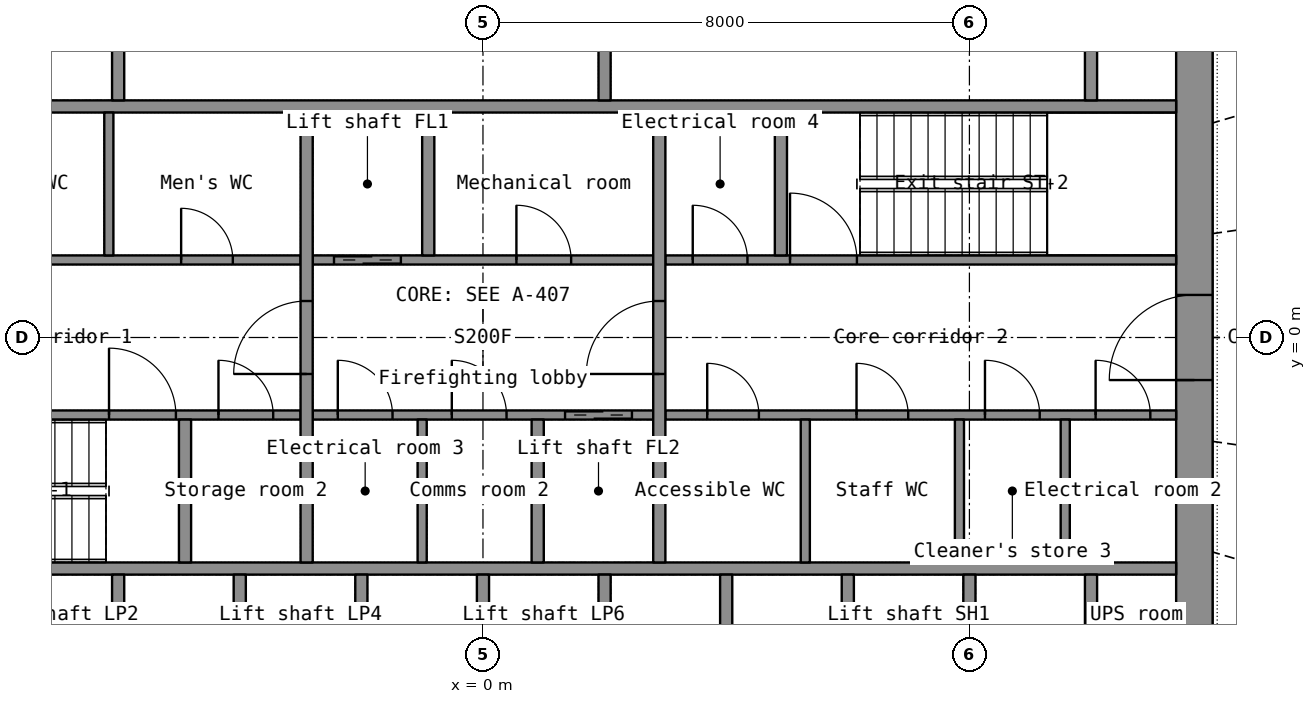
"""IFC4 building model, lengths in metres.
Left out: names, types, materials, properties, quantities, classifications, styles, units other than length and angle.
Written with IfcOpenShell. Run it as: python <this file> out.ifc"""

import sys

from ifc_helpers import new_model, si_unit, direction, frame, frame_2d, origin, place, context, subcontext, project, spatial, rectangle, extrude, element, fill, save


model = new_model("IFC4")
c1 = context("Model", 3, precision=1e-05, world=origin(), true_north=direction((0.0, 1.0)))
c2 = subcontext(c1, "Body", "Model", "MODEL_VIEW")
j1 = project(units=[si_unit("LENGTHUNIT", "METRE"), si_unit("PLANEANGLEUNIT", "RADIAN")], contexts=[c1])
p1 = place(None, origin())
s1 = spatial("IfcSite", under=j1, at=p1, CompositionType="ELEMENT")
p2 = place(p1, origin())
s2 = spatial("IfcBuilding", under=s1, at=p2, CompositionType="ELEMENT")
p3 = place(p2, frame((0.0, 0.0, 32.9)))
s3 = spatial("IfcBuildingStorey", under=s2, at=p3, CompositionType="ELEMENT", Elevation=32.9)
p4 = place(p3, frame((11.7, -7.2, 0.0), z_axis=(0.0, 0.0, 1.0), x_axis=(0.0, 1.0, 0.0)))
e1 = element("IfcWall", 1, at=p4, inside=s3, PredefinedType="SHEAR", context=c2, shape_type="SweptSolid", body=[
    extrude(rectangle(XDim=14.4, YDim=0.6, at=frame_2d((7.2, 0.0))), origin(), (0.0, 0.0, 1.0), 3.8),
])
p5 = place(p4, frame((6.5, 0.0, 0.0)))
e2 = element("IfcOpeningElement", 2, at=p5, cuts=e1, PredefinedType="OPENING", context=c2, shape_type="SweptSolid", body=[
    extrude(rectangle(XDim=1.4, YDim=2.2, at=frame_2d((0.7, 1.1))), frame((0.0, 0.31, 0.0), z_axis=(0.0, -1.0, 0.0), x_axis=(1.0, 0.0, 0.0)), (0.0, 0.0, 1.0), 0.62),
])
for number, where, z_axis, x_axis in (
    (3, (-11.4, -3.8, 0.0), (0.0, 0.0, 1.0), (1.0, 0.0, 0.0)),
    (4, (-11.4, 3.8, 0.0), (0.0, 0.0, 1.0), (1.0, 0.0, 0.0)),
):
    element("IfcWall", number, at=place(p3, frame(where, z_axis=z_axis, x_axis=x_axis)), inside=s3, PredefinedType="SHEAR", context=c2, shape_type="SweptSolid", body=[
        extrude(rectangle(XDim=22.8, YDim=0.2, at=frame_2d((11.4, 0.0))), origin(), (0.0, 0.0, 1.0), 3.8),
    ])
for number, where, z_axis, x_axis in (
    (5, (-6.0, -6.6, 0.0), (0.0, 0.0, 1.0), (0.0, 1.0, 0.0)),
    (6, (-4.0, -6.6, 0.0), (0.0, 0.0, 1.0), (0.0, 1.0, 0.0)),
    (7, (-2.0, -6.6, 0.0), (0.0, 0.0, 1.0), (0.0, 1.0, 0.0)),
    (8, (0.0, -6.6, 0.0), (0.0, 0.0, 1.0), (0.0, 1.0, 0.0)),
    (9, (2.0, -6.6, 0.0), (0.0, 0.0, 1.0), (0.0, 1.0, 0.0)),
    (10, (4.0, -6.6, 0.0), (0.0, 0.0, 1.0), (0.0, 1.0, 0.0)),
    (11, (6.0, -6.6, 0.0), (0.0, 0.0, 1.0), (0.0, 1.0, 0.0)),
    (12, (8.0, -6.6, 0.0), (0.0, 0.0, 1.0), (0.0, 1.0, 0.0)),
    (13, (10.0, -6.6, 0.0), (0.0, 0.0, 1.0), (0.0, 1.0, 0.0)),
    (14, (-6.0, 3.9, 0.0), (0.0, 0.0, 1.0), (0.0, 1.0, 0.0)),
    (15, (10.0, 3.9, 0.0), (0.0, 0.0, 1.0), (0.0, 1.0, 0.0)),
):
    element("IfcWall", number, at=place(p3, frame(where, z_axis=z_axis, x_axis=x_axis)), inside=s3, PredefinedType="SHEAR", context=c2, shape_type="SweptSolid", body=[
        extrude(rectangle(XDim=2.7, YDim=0.2, at=frame_2d((1.35, 0.0))), origin(), (0.0, 0.0, 1.0), 3.8),
    ])
p6 = place(p3, frame((2.0, 3.9, 0.0), z_axis=(0.0, 0.0, 1.0), x_axis=(0.0, 1.0, 0.0)))
e16 = element("IfcWall", 16, at=p6, inside=s3, PredefinedType="PARTITIONING", context=c2, shape_type="SweptSolid", body=[
    extrude(rectangle(XDim=2.7, YDim=0.2, at=frame_2d((1.35, 0.0))), origin(), (0.0, 0.0, 1.0), 3.8),
])
p7 = place(p3, frame((-11.4, -1.275, 0.0), z_axis=(0.0, 0.0, 1.0), x_axis=(1.0, 0.0, 0.0)))
e17 = element("IfcWall", 17, at=p7, inside=s3, PredefinedType="SHEAR", context=c2, shape_type="SweptSolid", body=[
    extrude(rectangle(XDim=8.4, YDim=0.15, at=frame_2d((4.2, 0.0))), origin(), (0.0, 0.0, 1.0), 3.8),
])
p8 = place(p7, frame((5.25, 0.0, 0.0)))
e18 = element("IfcOpeningElement", 18, at=p8, cuts=e17, PredefinedType="OPENING", context=c2, shape_type="SweptSolid", body=[
    extrude(rectangle(XDim=1.1, YDim=2.15, at=frame_2d((0.55, 1.075))), frame((0.0, 0.085, 0.0), z_axis=(0.0, -1.0, 0.0), x_axis=(1.0, 0.0, 0.0)), (0.0, 0.0, 1.0), 0.17),
])
p9 = place(p7, frame((7.05, 0.0, 0.0)))
e19 = element("IfcOpeningElement", 19, at=p9, cuts=e17, PredefinedType="OPENING", context=c2, shape_type="SweptSolid", body=[
    extrude(rectangle(XDim=0.9, YDim=2.1, at=frame_2d((0.45, 1.05))), frame((0.0, 0.085, 0.0), z_axis=(0.0, -1.0, 0.0), x_axis=(1.0, 0.0, 0.0)), (0.0, 0.0, 1.0), 0.17),
])
p10 = place(p3, frame((-2.8, -1.275, 0.0), z_axis=(0.0, 0.0, 1.0), x_axis=(1.0, 0.0, 0.0)))
e20 = element("IfcWall", 20, at=p10, inside=s3, PredefinedType="SHEAR", context=c2, shape_type="SweptSolid", body=[
    extrude(rectangle(XDim=5.6, YDim=0.15, at=frame_2d((2.8, 0.0))), origin(), (0.0, 0.0, 1.0), 3.8),
])
p11 = place(p10, frame((4.15, 0.0, 0.0)))
e21 = element("IfcOpeningElement", 21, at=p11, cuts=e20, PredefinedType="OPENING", context=c2, shape_type="SweptSolid", body=[
    extrude(rectangle(XDim=1.1, YDim=2.2, at=frame_2d((0.55, 1.1))), frame((0.0, 0.085, 0.0), z_axis=(0.0, -1.0, 0.0), x_axis=(1.0, 0.0, 0.0)), (0.0, 0.0, 1.0), 0.17),
])
p12 = place(p10, frame((0.413, 0.0, 0.0)))
e22 = element("IfcOpeningElement", 22, at=p12, cuts=e20, PredefinedType="OPENING", context=c2, shape_type="SweptSolid", body=[
    extrude(rectangle(XDim=0.9, YDim=2.1, at=frame_2d((0.45, 1.05))), frame((0.0, 0.085, 0.0), z_axis=(0.0, -1.0, 0.0), x_axis=(1.0, 0.0, 0.0)), (0.0, 0.0, 1.0), 0.17),
])
p13 = place(p10, frame((2.288, 0.0, 0.0)))
e23 = element("IfcOpeningElement", 23, at=p13, cuts=e20, PredefinedType="OPENING", context=c2, shape_type="SweptSolid", body=[
    extrude(rectangle(XDim=0.9, YDim=2.1, at=frame_2d((0.45, 1.05))), frame((0.0, 0.085, 0.0), z_axis=(0.0, -1.0, 0.0), x_axis=(1.0, 0.0, 0.0)), (0.0, 0.0, 1.0), 0.17),
])
p14 = place(p3, frame((3.0, -1.275, 0.0), z_axis=(0.0, 0.0, 1.0), x_axis=(1.0, 0.0, 0.0)))
e24 = element("IfcWall", 24, at=p14, inside=s3, PredefinedType="PARTITIONING", context=c2, shape_type="SweptSolid", body=[
    extrude(rectangle(XDim=8.4, YDim=0.15, at=frame_2d((4.2, 0.0))), origin(), (0.0, 0.0, 1.0), 3.8),
])
p15 = place(p14, frame((0.688, 0.0, 0.0)))
e25 = element("IfcOpeningElement", 25, at=p15, cuts=e24, PredefinedType="OPENING", context=c2, shape_type="SweptSolid", body=[
    extrude(rectangle(XDim=0.85, YDim=2.1, at=frame_2d((0.425, 1.05))), frame((0.0, 0.085, 0.0), z_axis=(0.0, -1.0, 0.0), x_axis=(1.0, 0.0, 0.0)), (0.0, 0.0, 1.0), 0.17),
])
p16 = place(p14, frame((3.144, 0.0, 0.0)))
e26 = element("IfcOpeningElement", 26, at=p16, cuts=e24, PredefinedType="OPENING", context=c2, shape_type="SweptSolid", body=[
    extrude(rectangle(XDim=0.85, YDim=2.1, at=frame_2d((0.425, 1.05))), frame((0.0, 0.085, 0.0), z_axis=(0.0, -1.0, 0.0), x_axis=(1.0, 0.0, 0.0)), (0.0, 0.0, 1.0), 0.17),
])
p17 = place(p14, frame((5.256, 0.0, 0.0)))
e27 = element("IfcOpeningElement", 27, at=p17, cuts=e24, PredefinedType="OPENING", context=c2, shape_type="SweptSolid", body=[
    extrude(rectangle(XDim=0.9, YDim=2.1, at=frame_2d((0.45, 1.05))), frame((0.0, 0.085, 0.0), z_axis=(0.0, -1.0, 0.0), x_axis=(1.0, 0.0, 0.0)), (0.0, 0.0, 1.0), 0.17),
])
p18 = place(p14, frame((7.075, 0.0, 0.0)))
e28 = element("IfcOpeningElement", 28, at=p18, cuts=e24, PredefinedType="OPENING", context=c2, shape_type="SweptSolid", body=[
    extrude(rectangle(XDim=0.9, YDim=2.1, at=frame_2d((0.45, 1.05))), frame((0.0, 0.085, 0.0), z_axis=(0.0, -1.0, 0.0), x_axis=(1.0, 0.0, 0.0)), (0.0, 0.0, 1.0), 0.17),
])
p19 = place(p3, frame((-11.4, 1.275, 0.0), z_axis=(0.0, 0.0, 1.0), x_axis=(1.0, 0.0, 0.0)))
e29 = element("IfcWall", 29, at=p19, inside=s3, PredefinedType="PARTITIONING", context=c2, shape_type="SweptSolid", body=[
    extrude(rectangle(XDim=8.4, YDim=0.15, at=frame_2d((4.2, 0.0))), origin(), (0.0, 0.0, 1.0), 3.8),
])
p20 = place(p19, frame((0.522, 0.0, 0.0)))
e30 = element("IfcOpeningElement", 30, at=p20, cuts=e29, PredefinedType="OPENING", context=c2, shape_type="SweptSolid", body=[
    extrude(rectangle(XDim=0.9, YDim=2.1, at=frame_2d((0.45, 1.05))), frame((0.0, 0.085, 0.0), z_axis=(0.0, -1.0, 0.0), x_axis=(1.0, 0.0, 0.0)), (0.0, 0.0, 1.0), 0.17),
])
p21 = place(p19, frame((3.208, 0.0, 0.0)))
e31 = element("IfcOpeningElement", 31, at=p21, cuts=e29, PredefinedType="OPENING", context=c2, shape_type="SweptSolid", body=[
    extrude(rectangle(XDim=0.85, YDim=2.1, at=frame_2d((0.425, 1.05))), frame((0.0, 0.085, 0.0), z_axis=(0.0, -1.0, 0.0), x_axis=(1.0, 0.0, 0.0)), (0.0, 0.0, 1.0), 0.17),
])
p22 = place(p19, frame((6.436, 0.0, 0.0)))
e32 = element("IfcOpeningElement", 32, at=p22, cuts=e29, PredefinedType="OPENING", context=c2, shape_type="SweptSolid", body=[
    extrude(rectangle(XDim=0.85, YDim=2.1, at=frame_2d((0.425, 1.05))), frame((0.0, 0.085, 0.0), z_axis=(0.0, -1.0, 0.0), x_axis=(1.0, 0.0, 0.0)), (0.0, 0.0, 1.0), 0.17),
])
p23 = place(p3, frame((-2.8, 1.275, 0.0), z_axis=(0.0, 0.0, 1.0), x_axis=(1.0, 0.0, 0.0)))
e33 = element("IfcWall", 33, at=p23, inside=s3, PredefinedType="SHEAR", context=c2, shape_type="SweptSolid", body=[
    extrude(rectangle(XDim=5.6, YDim=0.15, at=frame_2d((2.8, 0.0))), origin(), (0.0, 0.0, 1.0), 3.8),
])
p24 = place(p23, frame((0.35, 0.0, 0.0)))
e34 = element("IfcOpeningElement", 34, at=p24, cuts=e33, PredefinedType="OPENING", context=c2, shape_type="SweptSolid", body=[
    extrude(rectangle(XDim=1.1, YDim=2.2, at=frame_2d((0.55, 1.1))), frame((0.0, 0.085, 0.0), z_axis=(0.0, -1.0, 0.0), x_axis=(1.0, 0.0, 0.0)), (0.0, 0.0, 1.0), 0.17),
])
p25 = place(p23, frame((3.35, 0.0, 0.0)))
e35 = element("IfcOpeningElement", 35, at=p25, cuts=e33, PredefinedType="OPENING", context=c2, shape_type="SweptSolid", body=[
    extrude(rectangle(XDim=0.9, YDim=2.1, at=frame_2d((0.45, 1.05))), frame((0.0, 0.085, 0.0), z_axis=(0.0, -1.0, 0.0), x_axis=(1.0, 0.0, 0.0)), (0.0, 0.0, 1.0), 0.17),
])
p26 = place(p3, frame((3.0, 1.275, 0.0), z_axis=(0.0, 0.0, 1.0), x_axis=(1.0, 0.0, 0.0)))
e36 = element("IfcWall", 36, at=p26, inside=s3, PredefinedType="SHEAR", context=c2, shape_type="SweptSolid", body=[
    extrude(rectangle(XDim=8.4, YDim=0.15, at=frame_2d((4.2, 0.0))), origin(), (0.0, 0.0, 1.0), 3.8),
])
p27 = place(p26, frame((2.05, 0.0, 0.0)))
e37 = element("IfcOpeningElement", 37, at=p27, cuts=e36, PredefinedType="OPENING", context=c2, shape_type="SweptSolid", body=[
    extrude(rectangle(XDim=1.1, YDim=2.15, at=frame_2d((0.55, 1.075))), frame((0.0, 0.085, 0.0), z_axis=(0.0, -1.0, 0.0), x_axis=(1.0, 0.0, 0.0)), (0.0, 0.0, 1.0), 0.17),
])
p28 = place(p26, frame((0.45, 0.0, 0.0)))
e38 = element("IfcOpeningElement", 38, at=p28, cuts=e36, PredefinedType="OPENING", context=c2, shape_type="SweptSolid", body=[
    extrude(rectangle(XDim=0.9, YDim=2.1, at=frame_2d((0.45, 1.05))), frame((0.0, 0.085, 0.0), z_axis=(0.0, -1.0, 0.0), x_axis=(1.0, 0.0, 0.0)), (0.0, 0.0, 1.0), 0.17),
])
p29 = place(p3, frame((-2.9, -3.7, 0.0), z_axis=(0.0, 0.0, 1.0), x_axis=(0.0, 1.0, 0.0)))
e39 = element("IfcWall", 39, at=p29, inside=s3, PredefinedType="SHEAR", context=c2, shape_type="SweptSolid", body=[
    extrude(rectangle(XDim=7.4, YDim=0.2, at=frame_2d((3.7, 0.0))), origin(), (0.0, 0.0, 1.0), 3.8),
])
p30 = place(p29, frame((3.1, 0.0, 0.0)))
e40 = element("IfcOpeningElement", 40, at=p30, cuts=e39, PredefinedType="OPENING", context=c2, shape_type="SweptSolid", body=[
    extrude(rectangle(XDim=1.2, YDim=2.2, at=frame_2d((0.6, 1.1))), frame((0.0, 0.11, 0.0), z_axis=(0.0, -1.0, 0.0), x_axis=(1.0, 0.0, 0.0)), (0.0, 0.0, 1.0), 0.22),
])
p31 = place(p3, frame((2.9, -3.7, 0.0), z_axis=(0.0, 0.0, 1.0), x_axis=(0.0, 1.0, 0.0)))
e41 = element("IfcWall", 41, at=p31, inside=s3, PredefinedType="SHEAR", context=c2, shape_type="SweptSolid", body=[
    extrude(rectangle(XDim=7.4, YDim=0.2, at=frame_2d((3.7, 0.0))), origin(), (0.0, 0.0, 1.0), 3.8),
])
p32 = place(p31, frame((3.1, 0.0, 0.0)))
e42 = element("IfcOpeningElement", 42, at=p32, cuts=e41, PredefinedType="OPENING", context=c2, shape_type="SweptSolid", body=[
    extrude(rectangle(XDim=1.2, YDim=2.2, at=frame_2d((0.6, 1.1))), frame((0.0, 0.11, 0.0), z_axis=(0.0, -1.0, 0.0), x_axis=(1.0, 0.0, 0.0)), (0.0, 0.0, 1.0), 0.22),
])
for number, where, z_axis, x_axis in (
    (43, (-0.9, 1.35, 0.0), (0.0, 0.0, 1.0), (0.0, 1.0, 0.0)),
    (44, (0.9, -3.7, 0.0), (0.0, 0.0, 1.0), (0.0, 1.0, 0.0)),
    (45, (-4.9, -3.7, 0.0), (0.0, 0.0, 1.0), (0.0, 1.0, 0.0)),
    (46, (4.9, 1.35, 0.0), (0.0, 0.0, 1.0), (0.0, 1.0, 0.0)),
):
    element("IfcWall", number, at=place(p3, frame(where, z_axis=z_axis, x_axis=x_axis)), inside=s3, PredefinedType="SHEAR", context=c2, shape_type="SweptSolid", body=[
        extrude(rectangle(XDim=2.35, YDim=0.2, at=frame_2d((1.175, 0.0))), origin(), (0.0, 0.0, 1.0), 3.8),
    ])
for number, where, z_axis, x_axis in (
    (47, (-6.153, 1.35, 0.0), (0.0, 0.0, 1.0), (0.0, 1.0, 0.0)),
    (48, (5.301, -3.7, 0.0), (0.0, 0.0, 1.0), (0.0, 1.0, 0.0)),
    (49, (7.836, -3.7, 0.0), (0.0, 0.0, 1.0), (0.0, 1.0, 0.0)),
    (50, (9.576, -3.7, 0.0), (0.0, 0.0, 1.0), (0.0, 1.0, 0.0)),
    (51, (-1.0, -3.7, 0.0), (0.0, 0.0, 1.0), (0.0, 1.0, 0.0)),
):
    element("IfcWall", number, at=place(p3, frame(where, z_axis=z_axis, x_axis=x_axis)), inside=s3, PredefinedType="PARTITIONING", context=c2, shape_type="SweptSolid", body=[
        extrude(rectangle(XDim=2.35, YDim=0.15, at=frame_2d((1.175, 0.0))), origin(), (0.0, 0.0, 1.0), 3.8),
    ])
p33 = place(p5, origin())
e52 = element("IfcDoor", 52, at=p33, inside=s3, OperationType="DOUBLE_DOOR_SINGLE_SWING", PredefinedType="DOOR", context=c2, shape_type="SweptSolid", body=[
    extrude(rectangle(XDim=1.4, YDim=2.2, at=frame_2d((0.7, 1.1))), frame((0.0, 0.025, 0.0), z_axis=(0.0, -1.0, 0.0), x_axis=(1.0, 0.0, 0.0)), (0.0, 0.0, 1.0), 0.05),
])
fill(e2, e52)
p34 = place(p30, origin())
e53 = element("IfcDoor", 53, at=p34, inside=s3, OperationType="SINGLE_SWING_LEFT", PredefinedType="DOOR", context=c2, shape_type="SweptSolid", body=[
    extrude(rectangle(XDim=1.2, YDim=2.2, at=frame_2d((0.6, 1.1))), frame((0.0, 0.025, 0.0), z_axis=(0.0, -1.0, 0.0), x_axis=(1.0, 0.0, 0.0)), (0.0, 0.0, 1.0), 0.05),
])
fill(e40, e53)
p35 = place(p32, origin())
e54 = element("IfcDoor", 54, at=p35, inside=s3, OperationType="SINGLE_SWING_LEFT", PredefinedType="DOOR", context=c2, shape_type="SweptSolid", body=[
    extrude(rectangle(XDim=1.2, YDim=2.2, at=frame_2d((0.6, 1.1))), frame((0.0, 0.025, 0.0), z_axis=(0.0, -1.0, 0.0), x_axis=(1.0, 0.0, 0.0)), (0.0, 0.0, 1.0), 0.05),
])
fill(e42, e54)
p36 = place(p24, origin())
e55 = element("IfcDoor", 55, at=p36, inside=s3, OperationType="DOUBLE_DOOR_SLIDING", PredefinedType="DOOR", context=c2, shape_type="SweptSolid", body=[
    extrude(rectangle(XDim=1.1, YDim=2.2, at=frame_2d((0.55, 1.1))), frame((0.0, 0.025, 0.0), z_axis=(0.0, -1.0, 0.0), x_axis=(1.0, 0.0, 0.0)), (0.0, 0.0, 1.0), 0.05),
])
fill(e34, e55)
p37 = place(p11, origin())
e56 = element("IfcDoor", 56, at=p37, inside=s3, OperationType="DOUBLE_DOOR_SLIDING", PredefinedType="DOOR", context=c2, shape_type="SweptSolid", body=[
    extrude(rectangle(XDim=1.1, YDim=2.2, at=frame_2d((0.55, 1.1))), frame((0.0, 0.025, 0.0), z_axis=(0.0, -1.0, 0.0), x_axis=(1.0, 0.0, 0.0)), (0.0, 0.0, 1.0), 0.05),
])
fill(e21, e56)
p38 = place(p8, origin())
e57 = element("IfcDoor", 57, at=p38, inside=s3, OperationType="SINGLE_SWING_LEFT", PredefinedType="DOOR", context=c2, shape_type="SweptSolid", body=[
    extrude(rectangle(XDim=1.1, YDim=2.15, at=frame_2d((0.55, 1.075))), frame((0.0, 0.025, 0.0), z_axis=(0.0, -1.0, 0.0), x_axis=(1.0, 0.0, 0.0)), (0.0, 0.0, 1.0), 0.05),
])
fill(e18, e57)
p39 = place(p27, origin())
e58 = element("IfcDoor", 58, at=p39, inside=s3, OperationType="SINGLE_SWING_LEFT", PredefinedType="DOOR", context=c2, shape_type="SweptSolid", body=[
    extrude(rectangle(XDim=1.1, YDim=2.15, at=frame_2d((0.55, 1.075))), frame((0.0, 0.025, 0.0), z_axis=(0.0, -1.0, 0.0), x_axis=(1.0, 0.0, 0.0)), (0.0, 0.0, 1.0), 0.05),
])
fill(e37, e58)
p40 = place(p22, origin())
e59 = element("IfcDoor", 59, at=p40, inside=s3, OperationType="SINGLE_SWING_LEFT", PredefinedType="DOOR", context=c2, shape_type="SweptSolid", body=[
    extrude(rectangle(XDim=0.85, YDim=2.1, at=frame_2d((0.425, 1.05))), frame((0.0, 0.025, 0.0), z_axis=(0.0, -1.0, 0.0), x_axis=(1.0, 0.0, 0.0)), (0.0, 0.0, 1.0), 0.05),
])
fill(e32, e59)
p41 = place(p15, origin())
e60 = element("IfcDoor", 60, at=p41, inside=s3, OperationType="SINGLE_SWING_LEFT", PredefinedType="DOOR", context=c2, shape_type="SweptSolid", body=[
    extrude(rectangle(XDim=0.85, YDim=2.1, at=frame_2d((0.425, 1.05))), frame((0.0, 0.025, 0.0), z_axis=(0.0, -1.0, 0.0), x_axis=(1.0, 0.0, 0.0)), (0.0, 0.0, 1.0), 0.05),
])
fill(e25, e60)
p42 = place(p16, origin())
e61 = element("IfcDoor", 61, at=p42, inside=s3, OperationType="SINGLE_SWING_LEFT", PredefinedType="DOOR", context=c2, shape_type="SweptSolid", body=[
    extrude(rectangle(XDim=0.85, YDim=2.1, at=frame_2d((0.425, 1.05))), frame((0.0, 0.025, 0.0), z_axis=(0.0, -1.0, 0.0), x_axis=(1.0, 0.0, 0.0)), (0.0, 0.0, 1.0), 0.05),
])
fill(e26, e61)
p43 = place(p17, origin())
e62 = element("IfcDoor", 62, at=p43, inside=s3, OperationType="SINGLE_SWING_LEFT", PredefinedType="DOOR", context=c2, shape_type="SweptSolid", body=[
    extrude(rectangle(XDim=0.9, YDim=2.1, at=frame_2d((0.45, 1.05))), frame((0.0, 0.025, 0.0), z_axis=(0.0, -1.0, 0.0), x_axis=(1.0, 0.0, 0.0)), (0.0, 0.0, 1.0), 0.05),
])
fill(e27, e62)
p44 = place(p18, origin())
e63 = element("IfcDoor", 63, at=p44, inside=s3, OperationType="SINGLE_SWING_LEFT", PredefinedType="DOOR", context=c2, shape_type="SweptSolid", body=[
    extrude(rectangle(XDim=0.9, YDim=2.1, at=frame_2d((0.45, 1.05))), frame((0.0, 0.025, 0.0), z_axis=(0.0, -1.0, 0.0), x_axis=(1.0, 0.0, 0.0)), (0.0, 0.0, 1.0), 0.05),
])
fill(e28, e63)
p45 = place(p25, origin())
e64 = element("IfcDoor", 64, at=p45, inside=s3, OperationType="SINGLE_SWING_LEFT", PredefinedType="DOOR", context=c2, shape_type="SweptSolid", body=[
    extrude(rectangle(XDim=0.9, YDim=2.1, at=frame_2d((0.45, 1.05))), frame((0.0, 0.025, 0.0), z_axis=(0.0, -1.0, 0.0), x_axis=(1.0, 0.0, 0.0)), (0.0, 0.0, 1.0), 0.05),
])
fill(e35, e64)
p46 = place(p12, origin())
e65 = element("IfcDoor", 65, at=p46, inside=s3, OperationType="SINGLE_SWING_LEFT", PredefinedType="DOOR", context=c2, shape_type="SweptSolid", body=[
    extrude(rectangle(XDim=0.9, YDim=2.1, at=frame_2d((0.45, 1.05))), frame((0.0, 0.025, 0.0), z_axis=(0.0, -1.0, 0.0), x_axis=(1.0, 0.0, 0.0)), (0.0, 0.0, 1.0), 0.05),
])
fill(e22, e65)
p47 = place(p13, origin())
e66 = element("IfcDoor", 66, at=p47, inside=s3, OperationType="SINGLE_SWING_LEFT", PredefinedType="DOOR", context=c2, shape_type="SweptSolid", body=[
    extrude(rectangle(XDim=0.9, YDim=2.1, at=frame_2d((0.45, 1.05))), frame((0.0, 0.025, 0.0), z_axis=(0.0, -1.0, 0.0), x_axis=(1.0, 0.0, 0.0)), (0.0, 0.0, 1.0), 0.05),
])
fill(e23, e66)
p48 = place(p28, origin())
e67 = element("IfcDoor", 67, at=p48, inside=s3, OperationType="SINGLE_SWING_LEFT", PredefinedType="DOOR", context=c2, shape_type="SweptSolid", body=[
    extrude(rectangle(XDim=0.9, YDim=2.1, at=frame_2d((0.45, 1.05))), frame((0.0, 0.025, 0.0), z_axis=(0.0, -1.0, 0.0), x_axis=(1.0, 0.0, 0.0)), (0.0, 0.0, 1.0), 0.05),
])
fill(e38, e67)
p49 = place(p9, origin())
e68 = element("IfcDoor", 68, at=p49, inside=s3, OperationType="SINGLE_SWING_LEFT", PredefinedType="DOOR", context=c2, shape_type="SweptSolid", body=[
    extrude(rectangle(XDim=0.9, YDim=2.1, at=frame_2d((0.45, 1.05))), frame((0.0, 0.025, 0.0), z_axis=(0.0, -1.0, 0.0), x_axis=(1.0, 0.0, 0.0)), (0.0, 0.0, 1.0), 0.05),
])
fill(e19, e68)
save(model, sys.argv[1])
